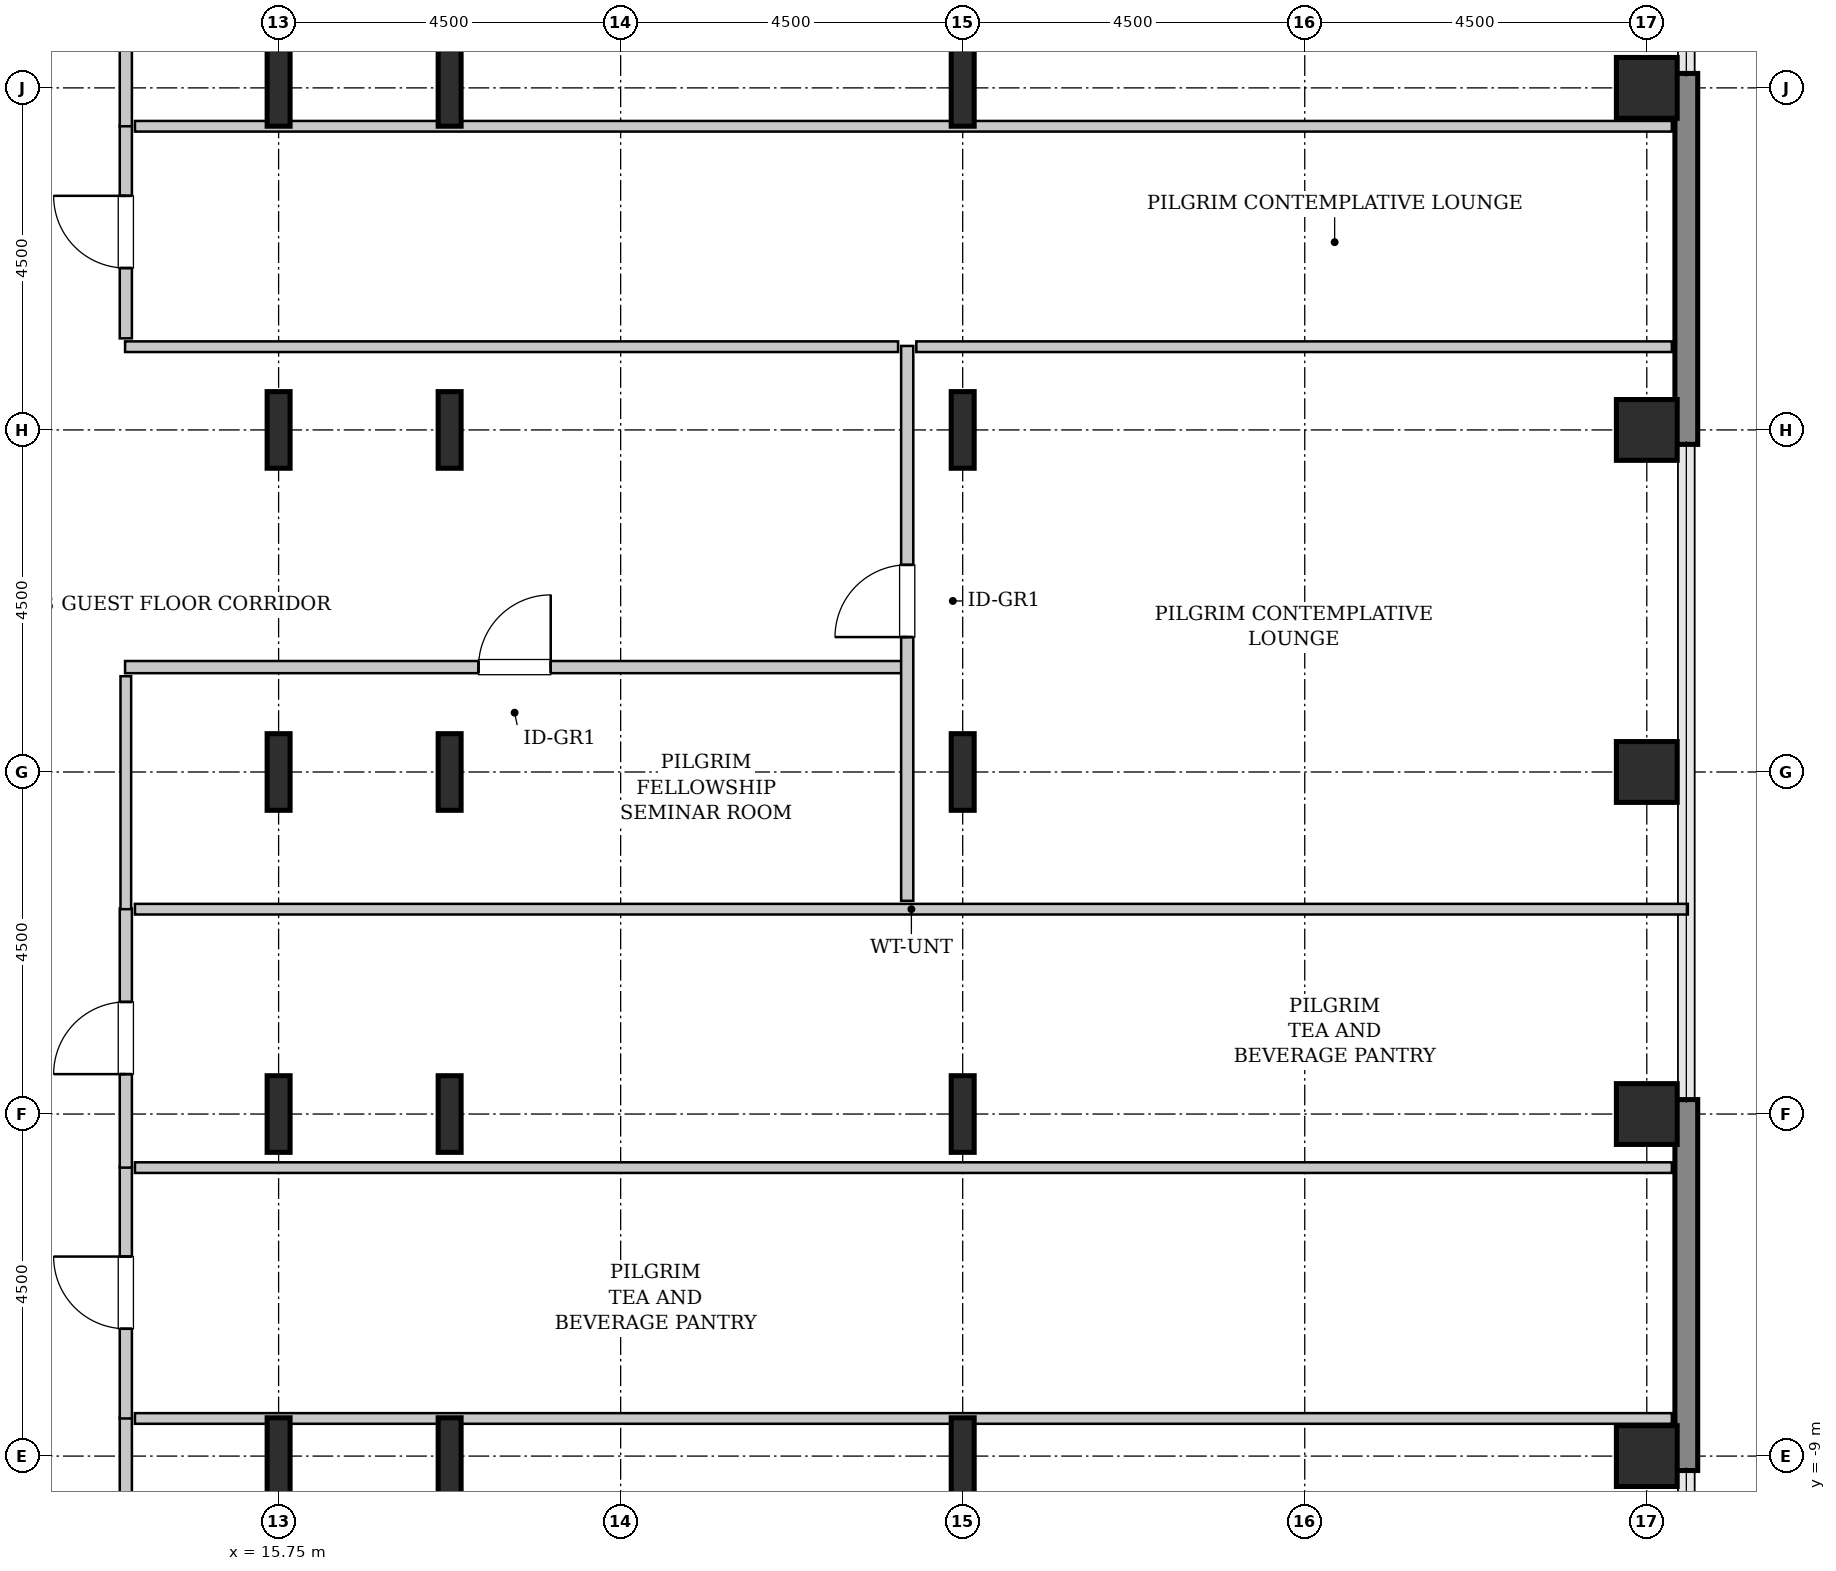
"""IFC4 building model, lengths in metres.
Left out: names, types, materials, properties, quantities, classifications, styles, units other than length and angle.
Written with IfcOpenShell. Run it as: python <this file> out.ifc"""

import sys

from ifc_helpers import new_model, si_unit, direction, frame, frame_2d, origin, origin_2d, place, context, subcontext, project, spatial, rectangle, hollow_rectangle, i_section, extrude, source, transform, mapped, element, fill, save


model = new_model("IFC4")
c1 = context("Model", 3, precision=1e-05, world=origin(), true_north=direction((0.0, 1.0)))
c2 = subcontext(c1, "Body", "Model", "MODEL_VIEW")
j1 = project(units=[si_unit("LENGTHUNIT", "METRE"), si_unit("PLANEANGLEUNIT", "RADIAN")], contexts=[c1])
p1 = place(None, origin())
s1 = spatial("IfcSite", under=j1, at=p1, CompositionType="ELEMENT")
p2 = place(p1, origin())
s2 = spatial("IfcBuilding", under=s1, at=p2, CompositionType="ELEMENT")
p3 = place(p2, frame((0.0, 0.0, 136.4)))
s3 = spatial("IfcBuildingStorey", under=s2, at=p3, CompositionType="ELEMENT", Elevation=136.4)
m1 = source(origin(), c2, "Body", "SweptSolid", [
    extrude(i_section(OverallWidth=0.302, OverallDepth=1.008, WebThickness=0.021, FlangeThickness=0.04, FilletRadius=0.03, at=origin_2d()), origin(), (0.0, 0.0, 1.0), 3.8),
])
for number, where, z_axis, x_axis in (
    (1, (15.75, -9.0, 0.0), (0.0, 0.0, 1.0), (1.0, 0.0, 0.0)),
    (2, (15.75, -4.5, 0.0), (0.0, 0.0, 1.0), (1.0, 0.0, 0.0)),
    (3, (15.75, 0.0, 0.0), (0.0, 0.0, 1.0), (1.0, 0.0, 0.0)),
    (4, (15.75, 4.5, 0.0), (0.0, 0.0, 1.0), (1.0, 0.0, 0.0)),
    (5, (15.75, 9.0, 0.0), (0.0, 0.0, 1.0), (1.0, 0.0, 0.0)),
    (6, (18.0, -9.0, 0.0), (0.0, 0.0, 1.0), (1.0, 0.0, 0.0)),
    (7, (18.0, -4.5, 0.0), (0.0, 0.0, 1.0), (1.0, 0.0, 0.0)),
    (8, (18.0, 0.0, 0.0), (0.0, 0.0, 1.0), (1.0, 0.0, 0.0)),
    (9, (18.0, 4.5, 0.0), (0.0, 0.0, 1.0), (1.0, 0.0, 0.0)),
    (10, (18.0, 9.0, 0.0), (0.0, 0.0, 1.0), (1.0, 0.0, 0.0)),
    (11, (24.75, -9.0, 0.0), (0.0, 0.0, 1.0), (1.0, 0.0, 0.0)),
    (12, (24.75, -4.5, 0.0), (0.0, 0.0, 1.0), (1.0, 0.0, 0.0)),
    (13, (24.75, 0.0, 0.0), (0.0, 0.0, 1.0), (1.0, 0.0, 0.0)),
    (14, (24.75, 4.5, 0.0), (0.0, 0.0, 1.0), (1.0, 0.0, 0.0)),
    (15, (24.75, 9.0, 0.0), (0.0, 0.0, 1.0), (1.0, 0.0, 0.0)),
):
    element("IfcColumn", number, at=place(p3, frame(where, z_axis=z_axis, x_axis=x_axis)), inside=s3, PredefinedType="COLUMN", context=c2, shape_type="MappedRepresentation", body=[
        mapped(m1, transform((0.0, 0.0, 0.0), x_axis=(1.0, 0.0, 0.0), y_axis=(0.0, 1.0, 0.0), z_axis=(0.0, 0.0, 1.0), scale=1.0)),
    ])
m2 = source(origin(), c2, "Body", "SweptSolid", [
    extrude(hollow_rectangle(XDim=0.8, YDim=0.8, WallThickness=0.04, InnerFilletRadius=0.04, OuterFilletRadius=0.08, at=origin_2d()), origin(), (0.0, 0.0, 1.0), 3.8),
])
for number, where, z_axis, x_axis in (
    (16, (33.75, -9.0, 0.0), (0.0, 0.0, 1.0), (1.0, 0.0, 0.0)),
    (17, (33.75, -4.5, 0.0), (0.0, 0.0, 1.0), (1.0, 0.0, 0.0)),
    (18, (33.75, 0.0, 0.0), (0.0, 0.0, 1.0), (1.0, 0.0, 0.0)),
    (19, (33.75, 4.5, 0.0), (0.0, 0.0, 1.0), (1.0, 0.0, 0.0)),
    (20, (33.75, 9.0, 0.0), (0.0, 0.0, 1.0), (1.0, 0.0, 0.0)),
):
    element("IfcColumn", number, at=place(p3, frame(where, z_axis=z_axis, x_axis=x_axis)), inside=s3, PredefinedType="COLUMN", context=c2, shape_type="MappedRepresentation", body=[
        mapped(m2, transform((0.0, 0.0, 0.0), x_axis=(1.0, 0.0, 0.0), y_axis=(0.0, 1.0, 0.0), z_axis=(0.0, 0.0, 1.0), scale=1.0)),
    ])
m3 = source(origin(), c2, "Body", "SweptSolid", [
    extrude(rectangle(XDim=4.88, YDim=0.3, at=frame_2d((2.44, 0.0))), origin(), (0.0, 0.0, 1.0), 3.55),
])
for number, where, z_axis, x_axis in (
    (21, (34.27, -9.19, 0.0), (0.0, 0.0, 1.0), (0.0, 1.0, 0.0)),
    (22, (34.27, 4.31, 0.0), (0.0, 0.0, 1.0), (0.0, 1.0, 0.0)),
):
    element("IfcWall", number, at=place(p3, frame(where, z_axis=z_axis, x_axis=x_axis)), inside=s3, PredefinedType="SHEAR", context=c2, shape_type="MappedRepresentation", body=[
        mapped(m3, transform((0.0, 0.0, 0.0), x_axis=(1.0, 0.0, 0.0), y_axis=(0.0, 1.0, 0.0), z_axis=(0.0, 0.0, 1.0), scale=1.0)),
    ])
m4 = source(origin(), c2, "Body", "SweptSolid", [
    extrude(rectangle(XDim=14.545, YDim=0.16, at=frame_2d((7.272, 0.0))), origin(), (0.0, 0.0, 1.0), 3.535),
])
p4 = place(p3, frame((13.74, -23.04, 0.0), z_axis=(0.0, 0.0, 1.0), x_axis=(0.0, 1.0, 0.0)))
e23 = element("IfcWall", 23, at=p4, inside=s3, PredefinedType="PARTITIONING", context=c2, shape_type="MappedRepresentation", body=[
    mapped(m4, transform((0.0, 0.0, 0.0), x_axis=(1.0, 0.0, 0.0), y_axis=(0.0, 1.0, 0.0), z_axis=(0.0, 0.0, 1.0), scale=1.0)),
])
p5 = place(p4, frame((12.562, 0.0, 0.0)))
e24 = element("IfcOpeningElement", 24, at=p5, cuts=e23, PredefinedType="OPENING", context=c2, shape_type="SweptSolid", body=[
    extrude(rectangle(XDim=0.95, YDim=2.1, at=frame_2d((0.475, 1.05))), frame((0.0, 0.09, 0.0), z_axis=(0.0, -1.0, 0.0), x_axis=(1.0, 0.0, 0.0)), (0.0, 0.0, 1.0), 0.18),
])
m5 = source(origin(), c2, "Body", "SweptSolid", [
    extrude(rectangle(XDim=20.22, YDim=0.14, at=frame_2d((10.11, 0.0))), origin(), (0.0, 0.0, 1.0), 2.875),
])
p6 = place(p3, frame((13.86, -8.505, 0.0), z_axis=(0.0, 0.0, 1.0), x_axis=(1.0, 0.0, 0.0)))
e25 = element("IfcWall", 25, at=p6, inside=s3, PredefinedType="PARTITIONING", context=c2, shape_type="MappedRepresentation", body=[
    mapped(m5, transform((0.0, 0.0, 0.0), x_axis=(1.0, 0.0, 0.0), y_axis=(0.0, 1.0, 0.0), z_axis=(0.0, 0.0, 1.0), scale=1.0)),
])
m6 = source(origin(), c2, "Body", "SweptSolid", [
    extrude(rectangle(XDim=3.31, YDim=0.16, at=frame_2d((1.655, 0.0))), origin(), (0.0, 0.0, 1.0), 3.535),
])
p7 = place(p3, frame((13.74, -8.505, 0.0), z_axis=(0.0, 0.0, 1.0), x_axis=(0.0, 1.0, 0.0)))
e26 = element("IfcWall", 26, at=p7, inside=s3, PredefinedType="PARTITIONING", context=c2, shape_type="MappedRepresentation", body=[
    mapped(m6, transform((0.0, 0.0, 0.0), x_axis=(1.0, 0.0, 0.0), y_axis=(0.0, 1.0, 0.0), z_axis=(0.0, 0.0, 1.0), scale=1.0)),
])
p8 = place(p7, frame((1.18, 0.0, 0.0)))
e27 = element("IfcOpeningElement", 27, at=p8, cuts=e26, PredefinedType="OPENING", context=c2, shape_type="SweptSolid", body=[
    extrude(rectangle(XDim=0.95, YDim=2.1, at=frame_2d((0.475, 1.05))), frame((0.0, 0.09, 0.0), z_axis=(0.0, -1.0, 0.0), x_axis=(1.0, 0.0, 0.0)), (0.0, 0.0, 1.0), 0.18),
])
m7 = source(origin(), c2, "Body", "SweptSolid", [
    extrude(rectangle(XDim=20.22, YDim=0.14, at=frame_2d((10.11, 0.0))), origin(), (0.0, 0.0, 1.0), 3.535),
])
p9 = place(p3, frame((13.86, -5.205, 0.0), z_axis=(0.0, 0.0, 1.0), x_axis=(1.0, 0.0, 0.0)))
e28 = element("IfcWall", 28, at=p9, inside=s3, PredefinedType="PARTITIONING", context=c2, shape_type="MappedRepresentation", body=[
    mapped(m7, transform((0.0, 0.0, 0.0), x_axis=(1.0, 0.0, 0.0), y_axis=(0.0, 1.0, 0.0), z_axis=(0.0, 0.0, 1.0), scale=1.0)),
])
m8 = source(origin(), c2, "Body", "SweptSolid", [
    extrude(rectangle(XDim=3.41, YDim=0.16, at=frame_2d((1.705, 0.0))), origin(), (0.0, 0.0, 1.0), 3.535),
])
p10 = place(p3, frame((13.74, -5.205, 0.0), z_axis=(0.0, 0.0, 1.0), x_axis=(0.0, 1.0, 0.0)))
e29 = element("IfcWall", 29, at=p10, inside=s3, PredefinedType="PARTITIONING", context=c2, shape_type="MappedRepresentation", body=[
    mapped(m8, transform((0.0, 0.0, 0.0), x_axis=(1.0, 0.0, 0.0), y_axis=(0.0, 1.0, 0.0), z_axis=(0.0, 0.0, 1.0), scale=1.0)),
])
p11 = place(p10, frame((1.23, 0.0, 0.0)))
e30 = element("IfcOpeningElement", 30, at=p11, cuts=e29, PredefinedType="OPENING", context=c2, shape_type="SweptSolid", body=[
    extrude(rectangle(XDim=0.95, YDim=2.1, at=frame_2d((0.475, 1.05))), frame((0.0, 0.09, 0.0), z_axis=(0.0, -1.0, 0.0), x_axis=(1.0, 0.0, 0.0)), (0.0, 0.0, 1.0), 0.18),
])
m9 = source(origin(), c2, "Body", "SweptSolid", [
    extrude(rectangle(XDim=20.43, YDim=0.14, at=frame_2d((10.215, 0.0))), origin(), (0.0, 0.0, 1.0), 3.535),
])
p12 = place(p3, frame((13.86, -1.805, 0.0), z_axis=(0.0, 0.0, 1.0), x_axis=(1.0, 0.0, 0.0)))
e31 = element("IfcWall", 31, at=p12, inside=s3, PredefinedType="PARTITIONING", context=c2, shape_type="MappedRepresentation", body=[
    mapped(m9, transform((0.0, 0.0, 0.0), x_axis=(1.0, 0.0, 0.0), y_axis=(0.0, 1.0, 0.0), z_axis=(0.0, 0.0, 1.0), scale=1.0)),
])
m10 = source(origin(), c2, "Body", "SweptSolid", [
    extrude(rectangle(XDim=10.25, YDim=0.16, at=frame_2d((5.125, 0.0))), origin(), (0.0, 0.0, 1.0), 3.535),
])
p13 = place(p3, frame((13.73, 1.38, 0.0), z_axis=(0.0, 0.0, 1.0), x_axis=(1.0, 0.0, 0.0)))
e32 = element("IfcWall", 32, at=p13, inside=s3, PredefinedType="PARTITIONING", context=c2, shape_type="MappedRepresentation", body=[
    mapped(m10, transform((0.0, 0.0, 0.0), x_axis=(1.0, 0.0, 0.0), y_axis=(0.0, 1.0, 0.0), z_axis=(0.0, 0.0, 1.0), scale=1.0)),
])
p14 = place(p13, frame((4.65, 0.0, 0.0)))
e33 = element("IfcOpeningElement", 33, at=p14, cuts=e32, PredefinedType="OPENING", context=c2, shape_type="SweptSolid", body=[
    extrude(rectangle(XDim=0.95, YDim=2.1, at=frame_2d((0.475, 1.05))), frame((0.0, 0.09, 0.0), z_axis=(0.0, -1.0, 0.0), x_axis=(1.0, 0.0, 0.0)), (0.0, 0.0, 1.0), 0.18),
])
m11 = source(origin(), c2, "Body", "SweptSolid", [
    extrude(rectangle(XDim=3.065, YDim=0.14, at=frame_2d((1.532, 0.0))), origin(), (0.0, 0.0, 1.0), 3.535),
])
p15 = place(p3, frame((13.74, -1.805, 0.0), z_axis=(0.0, 0.0, 1.0), x_axis=(0.0, 1.0, 0.0)))
e34 = element("IfcWall", 34, at=p15, inside=s3, PredefinedType="PARTITIONING", context=c2, shape_type="MappedRepresentation", body=[
    mapped(m11, transform((0.0, 0.0, 0.0), x_axis=(1.0, 0.0, 0.0), y_axis=(0.0, 1.0, 0.0), z_axis=(0.0, 0.0, 1.0), scale=1.0)),
])
m12 = source(origin(), c2, "Body", "SweptSolid", [
    extrude(rectangle(XDim=7.3, YDim=0.16, at=frame_2d((3.65, 0.0))), origin(), (0.0, 0.0, 1.0), 3.535),
])
p16 = place(p3, frame((24.02, -1.695, 0.0), z_axis=(0.0, 0.0, 1.0), x_axis=(0.0, 1.0, 0.0)))
e35 = element("IfcWall", 35, at=p16, inside=s3, PredefinedType="PARTITIONING", context=c2, shape_type="MappedRepresentation", body=[
    mapped(m12, transform((0.0, 0.0, 0.0), x_axis=(1.0, 0.0, 0.0), y_axis=(0.0, 1.0, 0.0), z_axis=(0.0, 0.0, 1.0), scale=1.0)),
])
p17 = place(p16, frame((3.47, 0.0, 0.0)))
e36 = element("IfcOpeningElement", 36, at=p17, cuts=e35, PredefinedType="OPENING", context=c2, shape_type="SweptSolid", body=[
    extrude(rectangle(XDim=0.95, YDim=2.1, at=frame_2d((0.475, 1.05))), frame((0.0, 0.09, 0.0), z_axis=(0.0, -1.0, 0.0), x_axis=(1.0, 0.0, 0.0)), (0.0, 0.0, 1.0), 0.18),
])
m13 = source(origin(), c2, "Body", "SweptSolid", [
    extrude(rectangle(XDim=10.17, YDim=0.14, at=frame_2d((5.085, 0.0))), origin(), (0.0, 0.0, 1.0), 3.535),
])
p18 = place(p3, frame((13.73, 5.595, 0.0), z_axis=(0.0, 0.0, 1.0), x_axis=(1.0, 0.0, 0.0)))
e37 = element("IfcWall", 37, at=p18, inside=s3, PredefinedType="PARTITIONING", context=c2, shape_type="MappedRepresentation", body=[
    mapped(m13, transform((0.0, 0.0, 0.0), x_axis=(1.0, 0.0, 0.0), y_axis=(0.0, 1.0, 0.0), z_axis=(0.0, 0.0, 1.0), scale=1.0)),
])
m14 = source(origin(), c2, "Body", "SweptSolid", [
    extrude(rectangle(XDim=9.94, YDim=0.14, at=frame_2d((4.97, 0.0))), origin(), (0.0, 0.0, 1.0), 3.535),
])
p19 = place(p3, frame((24.14, 5.595, 0.0), z_axis=(0.0, 0.0, 1.0), x_axis=(1.0, 0.0, 0.0)))
e38 = element("IfcWall", 38, at=p19, inside=s3, PredefinedType="PARTITIONING", context=c2, shape_type="MappedRepresentation", body=[
    mapped(m14, transform((0.0, 0.0, 0.0), x_axis=(1.0, 0.0, 0.0), y_axis=(0.0, 1.0, 0.0), z_axis=(0.0, 0.0, 1.0), scale=1.0)),
])
m15 = source(origin(), c2, "Body", "SweptSolid", [
    extrude(rectangle(XDim=2.8, YDim=0.16, at=frame_2d((1.4, 0.0))), origin(), (0.0, 0.0, 1.0), 3.535),
])
p20 = place(p3, frame((13.74, 5.705, 0.0), z_axis=(0.0, 0.0, 1.0), x_axis=(0.0, 1.0, 0.0)))
e39 = element("IfcWall", 39, at=p20, inside=s3, PredefinedType="PARTITIONING", context=c2, shape_type="MappedRepresentation", body=[
    mapped(m15, transform((0.0, 0.0, 0.0), x_axis=(1.0, 0.0, 0.0), y_axis=(0.0, 1.0, 0.0), z_axis=(0.0, 0.0, 1.0), scale=1.0)),
])
p21 = place(p20, frame((0.925, 0.0, 0.0)))
e40 = element("IfcOpeningElement", 40, at=p21, cuts=e39, PredefinedType="OPENING", context=c2, shape_type="SweptSolid", body=[
    extrude(rectangle(XDim=0.95, YDim=2.1, at=frame_2d((0.475, 1.05))), frame((0.0, 0.09, 0.0), z_axis=(0.0, -1.0, 0.0), x_axis=(1.0, 0.0, 0.0)), (0.0, 0.0, 1.0), 0.18),
])
p22 = place(p3, frame((13.86, 8.495, 0.0), z_axis=(0.0, 0.0, 1.0), x_axis=(1.0, 0.0, 0.0)))
e41 = element("IfcWall", 41, at=p22, inside=s3, PredefinedType="PARTITIONING", context=c2, shape_type="MappedRepresentation", body=[
    mapped(m5, transform((0.0, 0.0, 0.0), x_axis=(1.0, 0.0, 0.0), y_axis=(0.0, 1.0, 0.0), z_axis=(0.0, 0.0, 1.0), scale=1.0)),
])
p23 = place(p3, frame((13.74, 8.495, 0.0), z_axis=(0.0, 0.0, 1.0), x_axis=(0.0, 1.0, 0.0)))
e42 = element("IfcWall", 42, at=p23, inside=s3, PredefinedType="PARTITIONING", context=c2, shape_type="MappedRepresentation", body=[
    mapped(m4, transform((0.0, 0.0, 0.0), x_axis=(1.0, 0.0, 0.0), y_axis=(0.0, 1.0, 0.0), z_axis=(0.0, 0.0, 1.0), scale=1.0)),
])
p24 = place(p23, frame((1.032, 0.0, 0.0)))
e43 = element("IfcOpeningElement", 43, at=p24, cuts=e42, PredefinedType="OPENING", context=c2, shape_type="SweptSolid", body=[
    extrude(rectangle(XDim=0.95, YDim=2.1, at=frame_2d((0.475, 1.05))), frame((0.0, 0.09, 0.0), z_axis=(0.0, -1.0, 0.0), x_axis=(1.0, 0.0, 0.0)), (0.0, 0.0, 1.0), 0.18),
])
m16 = source(origin(), c2, "Body", "SweptSolid", [
    extrude(rectangle(XDim=0.95, YDim=2.1, at=frame_2d((0.475, 1.05))), frame((0.0, 0.025, 0.0), z_axis=(0.0, -1.0, 0.0), x_axis=(1.0, 0.0, 0.0)), (0.0, 0.0, 1.0), 0.05),
])
p25 = place(p8, origin())
e44 = element("IfcDoor", 44, at=p25, inside=s3, OperationType="SINGLE_SWING_RIGHT", PredefinedType="DOOR", context=c2, shape_type="MappedRepresentation", body=[
    mapped(m16, transform((0.0, 0.0, 0.0), x_axis=(1.0, 0.0, 0.0), y_axis=(0.0, 1.0, 0.0), z_axis=(0.0, 0.0, 1.0), scale=1.0)),
])
fill(e27, e44)
p26 = place(p11, origin())
e45 = element("IfcDoor", 45, at=p26, inside=s3, OperationType="SINGLE_SWING_LEFT", PredefinedType="DOOR", context=c2, shape_type="MappedRepresentation", body=[
    mapped(m16, transform((0.0, 0.0, 0.0), x_axis=(1.0, 0.0, 0.0), y_axis=(0.0, 1.0, 0.0), z_axis=(0.0, 0.0, 1.0), scale=1.0)),
])
fill(e30, e45)
p27 = place(p14, origin())
e46 = element("IfcDoor", 46, at=p27, inside=s3, OperationType="SINGLE_SWING_RIGHT", PredefinedType="DOOR", context=c2, shape_type="MappedRepresentation", body=[
    mapped(m16, transform((0.0, 0.0, 0.0), x_axis=(1.0, 0.0, 0.0), y_axis=(0.0, 1.0, 0.0), z_axis=(0.0, 0.0, 1.0), scale=1.0)),
])
fill(e33, e46)
p28 = place(p17, origin())
e47 = element("IfcDoor", 47, at=p28, inside=s3, OperationType="SINGLE_SWING_LEFT", PredefinedType="DOOR", context=c2, shape_type="MappedRepresentation", body=[
    mapped(m16, transform((0.0, 0.0, 0.0), x_axis=(1.0, 0.0, 0.0), y_axis=(0.0, 1.0, 0.0), z_axis=(0.0, 0.0, 1.0), scale=1.0)),
])
fill(e36, e47)
p29 = place(p21, origin())
e48 = element("IfcDoor", 48, at=p29, inside=s3, OperationType="SINGLE_SWING_RIGHT", PredefinedType="DOOR", context=c2, shape_type="MappedRepresentation", body=[
    mapped(m16, transform((0.0, 0.0, 0.0), x_axis=(1.0, 0.0, 0.0), y_axis=(0.0, 1.0, 0.0), z_axis=(0.0, 0.0, 1.0), scale=1.0)),
])
fill(e40, e48)
save(model, sys.argv[1])
